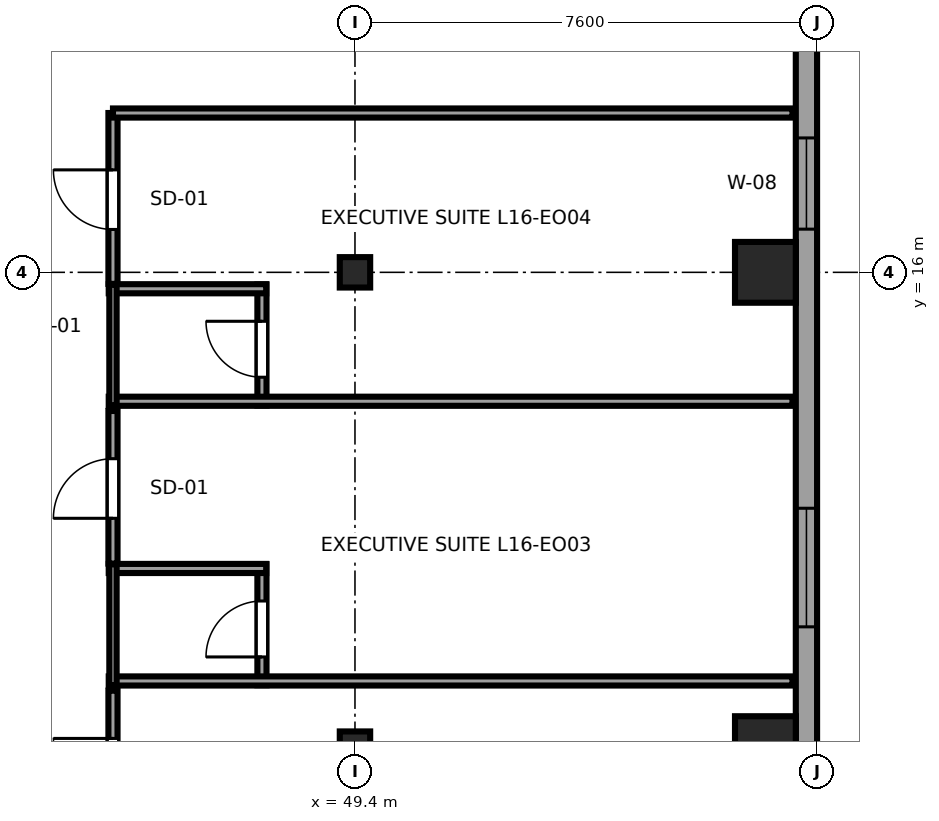
"""IFC4 building model, lengths in metres.
Left out: names, types, materials, properties, quantities, classifications, styles, units other than length and angle.
Written with IfcOpenShell. Run it as: python <this file> out.ifc"""

import sys

from ifc_helpers import new_model, si_unit, direction, frame, frame_2d, origin, origin_2d, place, context, subcontext, project, spatial, rectangle, i_section, extrude, source, transform, mapped, element, fill, save


model = new_model("IFC4")
c1 = context("Model", 3, precision=1e-05, world=origin(), true_north=direction((0.0, 1.0)))
c2 = subcontext(c1, "Body", "Model", "MODEL_VIEW")
j1 = project(units=[si_unit("LENGTHUNIT", "METRE"), si_unit("PLANEANGLEUNIT", "RADIAN")], contexts=[c1])
p1 = place(None, origin())
s1 = spatial("IfcSite", under=j1, at=p1, CompositionType="ELEMENT")
p2 = place(p1, origin())
s2 = spatial("IfcBuilding", under=s1, at=p2, CompositionType="ELEMENT")
p3 = place(p2, frame((0.0, 0.0, 67.5)))
s3 = spatial("IfcBuildingStorey", under=s2, at=p3, CompositionType="ELEMENT", Elevation=67.5)
m1 = source(origin(), c2, "Body", "SweptSolid", [
    extrude(i_section(OverallWidth=0.5, OverallDepth=0.5, WebThickness=0.028, FlangeThickness=0.045, at=origin_2d()), origin(), (0.0, 0.0, 1.0), 3.55),
])
for number, where, z_axis, x_axis in (
    (1, (49.4, 8.2, 0.0), (0.0, 0.0, 1.0), (1.0, 0.0, 0.0)),
    (2, (49.4, 16.0, 0.0), (0.0, 0.0, 1.0), (1.0, 0.0, 0.0)),
):
    element("IfcColumn", number, at=place(p3, frame(where, z_axis=z_axis, x_axis=x_axis)), inside=s3, PredefinedType="COLUMN", context=c2, shape_type="MappedRepresentation", body=[
        mapped(m1, transform((0.0, 0.0, 0.0), x_axis=(1.0, 0.0, 0.0), y_axis=(0.0, 1.0, 0.0), z_axis=(0.0, 0.0, 1.0), scale=1.0)),
    ])
m2 = source(origin(), c2, "Body", "SweptSolid", [
    extrude(rectangle(XDim=1.0, YDim=1.0, at=origin_2d()), origin(), (0.0, 0.0, 1.0), 3.55),
])
for number, where, z_axis, x_axis in (
    (3, (56.15, 8.2, 0.0), (0.0, 0.0, 1.0), (1.0, 0.0, 0.0)),
    (4, (56.15, 16.0, 0.0), (0.0, 0.0, 1.0), (1.0, 0.0, 0.0)),
):
    element("IfcColumn", number, at=place(p3, frame(where, z_axis=z_axis, x_axis=x_axis)), inside=s3, PredefinedType="COLUMN", context=c2, shape_type="MappedRepresentation", body=[
        mapped(m2, transform((0.0, 0.0, 0.0), x_axis=(1.0, 0.0, 0.0), y_axis=(0.0, 1.0, 0.0), z_axis=(0.0, 0.0, 1.0), scale=1.0)),
    ])
p4 = place(p3, frame((56.825, 4.617, 0.0), z_axis=(0.0, 0.0, 1.0), x_axis=(0.0, 1.0, 0.0)))
e5 = element("IfcWall", 5, at=p4, inside=s3, PredefinedType="SOLIDWALL", context=c2, shape_type="SweptSolid", body=[
    extrude(rectangle(XDim=36.766, YDim=0.35, at=frame_2d((18.383, 0.0))), origin(), (0.0, 0.0, 1.0), 3.37),
])
p5 = place(p4, frame((0.551, 0.0, 0.68)))
e6 = element("IfcOpeningElement", 6, at=p5, cuts=e5, PredefinedType="OPENING", context=c2, shape_type="SweptSolid", body=[
    extrude(rectangle(XDim=1.95, YDim=1.82, at=frame_2d((0.975, 0.91))), frame((0.0, 0.185, 0.0), z_axis=(0.0, -1.0, 0.0), x_axis=(1.0, 0.0, 0.0)), (0.0, 0.0, 1.0), 0.37),
])
p6 = place(p4, frame((5.553, 0.0, 0.68)))
e7 = element("IfcOpeningElement", 7, at=p6, cuts=e5, PredefinedType="OPENING", context=c2, shape_type="SweptSolid", body=[
    extrude(rectangle(XDim=1.95, YDim=1.82, at=frame_2d((0.975, 0.91))), frame((0.0, 0.185, 0.0), z_axis=(0.0, -1.0, 0.0), x_axis=(1.0, 0.0, 0.0)), (0.0, 0.0, 1.0), 0.37),
])
p7 = place(p4, frame((16.858, 0.0, 0.68)))
e8 = element("IfcOpeningElement", 8, at=p7, cuts=e5, PredefinedType="OPENING", context=c2, shape_type="SweptSolid", body=[
    extrude(rectangle(XDim=1.95, YDim=1.82, at=frame_2d((0.975, 0.91))), frame((0.0, 0.185, 0.0), z_axis=(0.0, -1.0, 0.0), x_axis=(1.0, 0.0, 0.0)), (0.0, 0.0, 1.0), 0.37),
])
p8 = place(p4, frame((25.311, 0.0, 0.68)))
e9 = element("IfcOpeningElement", 9, at=p8, cuts=e5, PredefinedType="OPENING", context=c2, shape_type="SweptSolid", body=[
    extrude(rectangle(XDim=1.95, YDim=1.82, at=frame_2d((0.975, 0.91))), frame((0.0, 0.185, 0.0), z_axis=(0.0, -1.0, 0.0), x_axis=(1.0, 0.0, 0.0)), (0.0, 0.0, 1.0), 0.37),
])
p9 = place(p4, frame((30.313, 0.0, 0.68)))
e10 = element("IfcOpeningElement", 10, at=p9, cuts=e5, PredefinedType="OPENING", context=c2, shape_type="SweptSolid", body=[
    extrude(rectangle(XDim=1.95, YDim=1.82, at=frame_2d((0.975, 0.91))), frame((0.0, 0.185, 0.0), z_axis=(0.0, -1.0, 0.0), x_axis=(1.0, 0.0, 0.0)), (0.0, 0.0, 1.0), 0.37),
])
p10 = place(p4, frame((33.215, 0.0, 0.68)))
e11 = element("IfcOpeningElement", 11, at=p10, cuts=e5, PredefinedType="OPENING", context=c2, shape_type="SweptSolid", body=[
    extrude(rectangle(XDim=1.95, YDim=1.82, at=frame_2d((0.975, 0.91))), frame((0.0, 0.185, 0.0), z_axis=(0.0, -1.0, 0.0), x_axis=(1.0, 0.0, 0.0)), (0.0, 0.0, 1.0), 0.37),
])
p11 = place(p4, frame((12.093, 0.0, 0.62)))
e12 = element("IfcOpeningElement", 12, at=p11, cuts=e5, PredefinedType="OPENING", context=c2, shape_type="SweptSolid", body=[
    extrude(rectangle(XDim=1.5, YDim=1.55, at=frame_2d((0.75, 0.775))), frame((0.0, 0.185, 0.0), z_axis=(0.0, -1.0, 0.0), x_axis=(1.0, 0.0, 0.0)), (0.0, 0.0, 1.0), 0.37),
])
p12 = place(p3, frame((47.87, 9.21, 0.0), z_axis=(0.0, 0.0, 1.0), x_axis=(0.0, 1.0, 0.0)))
e13 = element("IfcWall", 13, at=p12, inside=s3, PredefinedType="PARTITIONING", context=c2, shape_type="SweptSolid", body=[
    extrude(rectangle(XDim=1.99, YDim=0.15, at=frame_2d((0.995, 0.0))), origin(), (0.0, 0.0, 1.0), 3.37),
])
p13 = place(p12, frame((0.465, 0.0, 0.0)))
e14 = element("IfcOpeningElement", 14, at=p13, cuts=e13, PredefinedType="OPENING", context=c2, shape_type="SweptSolid", body=[
    extrude(rectangle(XDim=0.92, YDim=2.01, at=frame_2d((0.46, 1.005))), frame((0.0, 0.085, 0.0), z_axis=(0.0, -1.0, 0.0), x_axis=(1.0, 0.0, 0.0)), (0.0, 0.0, 1.0), 0.17),
])
p14 = place(p3, frame((45.35, 9.28, 0.0), z_axis=(0.0, 0.0, 1.0), x_axis=(1.0, 0.0, 0.0)))
e15 = element("IfcWall", 15, at=p14, inside=s3, PredefinedType="PARTITIONING", context=c2, shape_type="SweptSolid", body=[
    extrude(rectangle(XDim=11.245, YDim=0.15, at=frame_2d((5.623, 0.0))), origin(), (0.0, 0.0, 1.0), 3.37),
])
p15 = place(p3, frame((45.35, 11.13, 0.0), z_axis=(0.0, 0.0, 1.0), x_axis=(1.0, 0.0, 0.0)))
e16 = element("IfcWall", 16, at=p15, inside=s3, PredefinedType="PARTITIONING", context=c2, shape_type="SweptSolid", body=[
    extrude(rectangle(XDim=2.59, YDim=0.15, at=frame_2d((1.295, 0.0))), origin(), (0.0, 0.0, 1.0), 3.37),
])
p16 = place(p3, frame((45.42, 9.21, 0.0), z_axis=(0.0, 0.0, 1.0), x_axis=(0.0, 1.0, 0.0)))
e17 = element("IfcWall", 17, at=p16, inside=s3, PredefinedType="PLUMBINGWALL", context=c2, shape_type="SweptSolid", body=[
    extrude(rectangle(XDim=1.99, YDim=0.12, at=frame_2d((0.995, 0.0))), origin(), (0.0, 0.0, 1.0), 3.37),
])
p17 = place(p3, frame((47.87, 13.81, 0.0), z_axis=(0.0, 0.0, 1.0), x_axis=(0.0, 1.0, 0.0)))
e18 = element("IfcWall", 18, at=p17, inside=s3, PredefinedType="PARTITIONING", context=c2, shape_type="SweptSolid", body=[
    extrude(rectangle(XDim=1.99, YDim=0.15, at=frame_2d((0.995, 0.0))), origin(), (0.0, 0.0, 1.0), 3.37),
])
p18 = place(p17, frame((0.465, 0.0, 0.0)))
e19 = element("IfcOpeningElement", 19, at=p18, cuts=e18, PredefinedType="OPENING", context=c2, shape_type="SweptSolid", body=[
    extrude(rectangle(XDim=0.92, YDim=2.01, at=frame_2d((0.46, 1.005))), frame((0.0, 0.085, 0.0), z_axis=(0.0, -1.0, 0.0), x_axis=(1.0, 0.0, 0.0)), (0.0, 0.0, 1.0), 0.17),
])
p19 = place(p3, frame((45.35, 13.88, 0.0), z_axis=(0.0, 0.0, 1.0), x_axis=(1.0, 0.0, 0.0)))
e20 = element("IfcWall", 20, at=p19, inside=s3, PredefinedType="PARTITIONING", context=c2, shape_type="SweptSolid", body=[
    extrude(rectangle(XDim=11.245, YDim=0.15, at=frame_2d((5.623, 0.0))), origin(), (0.0, 0.0, 1.0), 3.37),
])
p20 = place(p3, frame((45.35, 15.73, 0.0), z_axis=(0.0, 0.0, 1.0), x_axis=(1.0, 0.0, 0.0)))
e21 = element("IfcWall", 21, at=p20, inside=s3, PredefinedType="PARTITIONING", context=c2, shape_type="SweptSolid", body=[
    extrude(rectangle(XDim=2.59, YDim=0.15, at=frame_2d((1.295, 0.0))), origin(), (0.0, 0.0, 1.0), 3.37),
])
p21 = place(p3, frame((45.42, 13.81, 0.0), z_axis=(0.0, 0.0, 1.0), x_axis=(0.0, 1.0, 0.0)))
e22 = element("IfcWall", 22, at=p21, inside=s3, PredefinedType="PLUMBINGWALL", context=c2, shape_type="SweptSolid", body=[
    extrude(rectangle(XDim=1.99, YDim=0.12, at=frame_2d((0.995, 0.0))), origin(), (0.0, 0.0, 1.0), 3.37),
])
p22 = place(p3, frame((45.42, 6.61, 0.0), z_axis=(0.0, 0.0, 1.0), x_axis=(0.0, 1.0, 0.0)))
e23 = element("IfcWall", 23, at=p22, inside=s3, PredefinedType="PARTITIONING", context=c2, shape_type="SweptSolid", body=[
    extrude(rectangle(XDim=2.51, YDim=0.15, at=frame_2d((1.255, 0.0))), origin(), (0.0, 0.0, 1.0), 3.37),
])
p23 = place(p22, frame((0.745, 0.0, 0.0)))
e24 = element("IfcOpeningElement", 24, at=p23, cuts=e23, PredefinedType="OPENING", context=c2, shape_type="SweptSolid", body=[
    extrude(rectangle(XDim=0.98, YDim=2.12, at=frame_2d((0.49, 1.06))), frame((0.0, 0.085, 0.0), z_axis=(0.0, -1.0, 0.0), x_axis=(1.0, 0.0, 0.0)), (0.0, 0.0, 1.0), 0.17),
])
p24 = place(p3, frame((45.42, 11.21, 0.0), z_axis=(0.0, 0.0, 1.0), x_axis=(0.0, 1.0, 0.0)))
e25 = element("IfcWall", 25, at=p24, inside=s3, PredefinedType="PARTITIONING", context=c2, shape_type="SweptSolid", body=[
    extrude(rectangle(XDim=2.51, YDim=0.15, at=frame_2d((1.255, 0.0))), origin(), (0.0, 0.0, 1.0), 3.37),
])
p25 = place(p24, frame((0.745, 0.0, 0.0)))
e26 = element("IfcOpeningElement", 26, at=p25, cuts=e25, PredefinedType="OPENING", context=c2, shape_type="SweptSolid", body=[
    extrude(rectangle(XDim=0.98, YDim=2.12, at=frame_2d((0.49, 1.06))), frame((0.0, 0.085, 0.0), z_axis=(0.0, -1.0, 0.0), x_axis=(1.0, 0.0, 0.0)), (0.0, 0.0, 1.0), 0.17),
])
p26 = place(p3, frame((45.42, 15.81, 0.0), z_axis=(0.0, 0.0, 1.0), x_axis=(0.0, 1.0, 0.0)))
e27 = element("IfcWall", 27, at=p26, inside=s3, PredefinedType="PARTITIONING", context=c2, shape_type="SweptSolid", body=[
    extrude(rectangle(XDim=2.81, YDim=0.15, at=frame_2d((1.405, 0.0))), origin(), (0.0, 0.0, 1.0), 3.37),
])
p27 = place(p26, frame((0.895, 0.0, 0.0)))
e28 = element("IfcOpeningElement", 28, at=p27, cuts=e27, PredefinedType="OPENING", context=c2, shape_type="SweptSolid", body=[
    extrude(rectangle(XDim=0.98, YDim=2.12, at=frame_2d((0.49, 1.06))), frame((0.0, 0.085, 0.0), z_axis=(0.0, -1.0, 0.0), x_axis=(1.0, 0.0, 0.0)), (0.0, 0.0, 1.0), 0.17),
])
p28 = place(p3, frame((45.42, 18.62, 0.0), z_axis=(0.0, 0.0, 1.0), x_axis=(1.0, 0.0, 0.0)))
e29 = element("IfcWall", 29, at=p28, inside=s3, PredefinedType="PARTITIONING", context=c2, shape_type="SweptSolid", body=[
    extrude(rectangle(XDim=11.175, YDim=0.15, at=frame_2d((5.587, 0.0))), origin(), (0.0, 0.0, 1.0), 3.37),
])
m3 = source(origin(), c2, "Body", "SweptSolid", [
    extrude(rectangle(XDim=1.95, YDim=1.82, at=frame_2d((0.975, 0.91))), frame((0.0, 0.09, 0.0), z_axis=(0.0, -1.0, 0.0), x_axis=(1.0, 0.0, 0.0)), (0.0, 0.0, 1.0), 0.06),
])
p29 = place(p6, origin())
e30 = element("IfcWindow", 30, at=p29, inside=s3, PartitioningType="DOUBLE_PANEL_VERTICAL", PredefinedType="WINDOW", context=c2, shape_type="MappedRepresentation", body=[
    mapped(m3, transform((0.0, 0.0, 0.0), x_axis=(1.0, 0.0, 0.0), y_axis=(0.0, 1.0, 0.0), z_axis=(0.0, 0.0, 1.0), scale=1.0)),
])
fill(e7, e30)
m4 = source(origin(), c2, "Body", "SweptSolid", [
    extrude(rectangle(XDim=1.5, YDim=1.55, at=frame_2d((0.75, 0.775))), frame((0.0, 0.09, 0.0), z_axis=(0.0, -1.0, 0.0), x_axis=(1.0, 0.0, 0.0)), (0.0, 0.0, 1.0), 0.06),
])
p30 = place(p11, origin())
e31 = element("IfcWindow", 31, at=p30, inside=s3, PartitioningType="SINGLE_PANEL", PredefinedType="WINDOW", context=c2, shape_type="MappedRepresentation", body=[
    mapped(m4, transform((0.0, 0.0, 0.0), x_axis=(1.0, 0.0, 0.0), y_axis=(0.0, 1.0, 0.0), z_axis=(0.0, 0.0, 1.0), scale=1.0)),
])
fill(e12, e31)
m5 = source(origin(), c2, "Body", "SweptSolid", [
    extrude(rectangle(XDim=0.92, YDim=2.01, at=frame_2d((0.46, 1.005))), frame((0.0, 0.025, 0.0), z_axis=(0.0, -1.0, 0.0), x_axis=(1.0, 0.0, 0.0)), (0.0, 0.0, 1.0), 0.05),
])
p31 = place(p13, origin())
e32 = element("IfcDoor", 32, at=p31, inside=s3, OperationType="SINGLE_SWING_LEFT", PredefinedType="DOOR", context=c2, shape_type="MappedRepresentation", body=[
    mapped(m5, transform((0.0, 0.0, 0.0), x_axis=(1.0, 0.0, 0.0), y_axis=(0.0, 1.0, 0.0), z_axis=(0.0, 0.0, 1.0), scale=1.0)),
])
fill(e14, e32)
p32 = place(p18, origin())
e33 = element("IfcDoor", 33, at=p32, inside=s3, OperationType="SINGLE_SWING_RIGHT", PredefinedType="DOOR", context=c2, shape_type="MappedRepresentation", body=[
    mapped(m5, transform((0.0, 0.0, 0.0), x_axis=(1.0, 0.0, 0.0), y_axis=(0.0, 1.0, 0.0), z_axis=(0.0, 0.0, 1.0), scale=1.0)),
])
fill(e19, e33)
m6 = source(origin(), c2, "Body", "SweptSolid", [
    extrude(rectangle(XDim=0.98, YDim=2.12, at=frame_2d((0.49, 1.06))), frame((0.0, 0.025, 0.0), z_axis=(0.0, -1.0, 0.0), x_axis=(1.0, 0.0, 0.0)), (0.0, 0.0, 1.0), 0.05),
])
p33 = place(p23, origin())
e34 = element("IfcDoor", 34, at=p33, inside=s3, OperationType="SINGLE_SWING_RIGHT", PredefinedType="DOOR", context=c2, shape_type="MappedRepresentation", body=[
    mapped(m6, transform((0.0, 0.0, 0.0), x_axis=(1.0, 0.0, 0.0), y_axis=(0.0, 1.0, 0.0), z_axis=(0.0, 0.0, 1.0), scale=1.0)),
])
fill(e24, e34)
p34 = place(p25, origin())
e35 = element("IfcDoor", 35, at=p34, inside=s3, OperationType="SINGLE_SWING_LEFT", PredefinedType="DOOR", context=c2, shape_type="MappedRepresentation", body=[
    mapped(m6, transform((0.0, 0.0, 0.0), x_axis=(1.0, 0.0, 0.0), y_axis=(0.0, 1.0, 0.0), z_axis=(0.0, 0.0, 1.0), scale=1.0)),
])
fill(e26, e35)
p35 = place(p27, origin())
e36 = element("IfcDoor", 36, at=p35, inside=s3, OperationType="SINGLE_SWING_RIGHT", PredefinedType="DOOR", context=c2, shape_type="MappedRepresentation", body=[
    mapped(m6, transform((0.0, 0.0, 0.0), x_axis=(1.0, 0.0, 0.0), y_axis=(0.0, 1.0, 0.0), z_axis=(0.0, 0.0, 1.0), scale=1.0)),
])
fill(e28, e36)
save(model, sys.argv[1])
